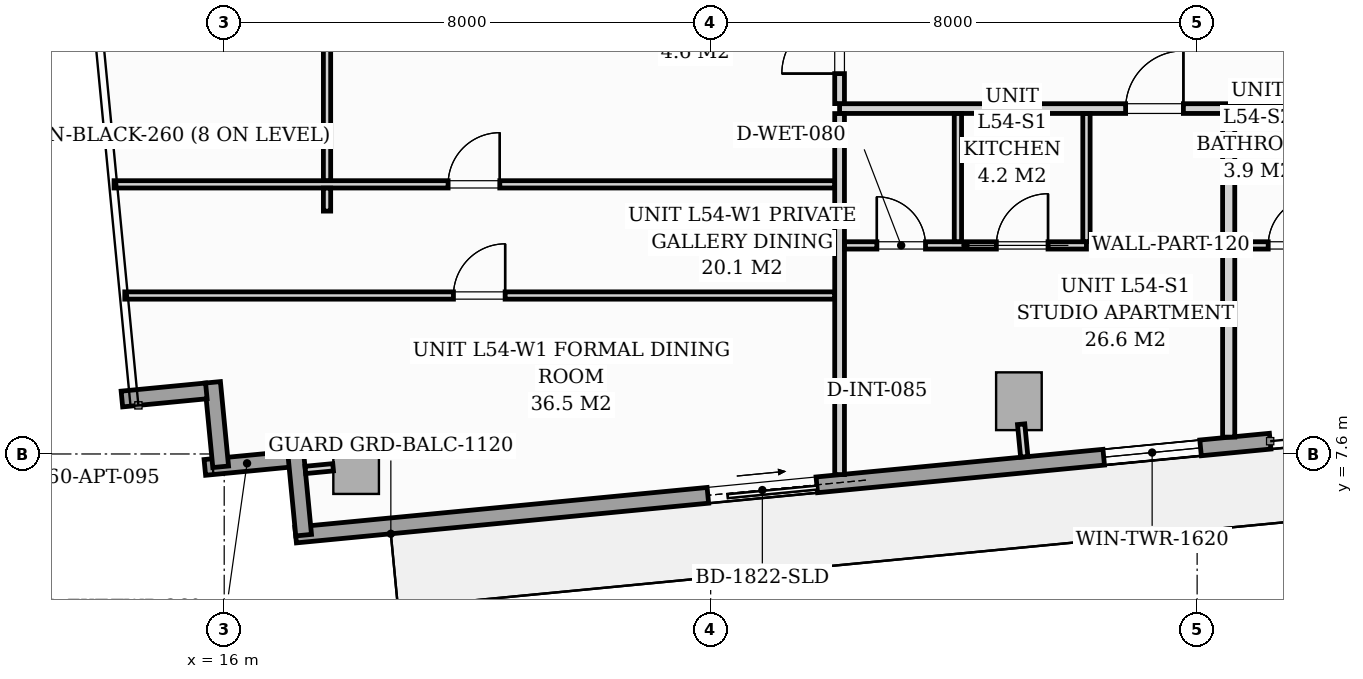
"""IFC4 building model, lengths in metres.
Left out: names, types, materials, properties, quantities, classifications, styles, units other than length and angle.
Written with IfcOpenShell. Run it as: python <this file> out.ifc"""

import sys

from ifc_helpers import new_model, si_unit, direction, frame, frame_2d, origin, origin_2d, place, context, subcontext, project, spatial, rectangle, extrude, source, transform, mapped, element, fill, save


model = new_model("IFC4")
c1 = context("Model", 3, precision=1e-05, world=origin(), true_north=direction((0.0, 1.0)))
c2 = subcontext(c1, "Body", "Model", "MODEL_VIEW")
j1 = project(units=[si_unit("LENGTHUNIT", "METRE"), si_unit("PLANEANGLEUNIT", "RADIAN")], contexts=[c1])
p1 = place(None, origin())
s1 = spatial("IfcSite", under=j1, at=p1, CompositionType="ELEMENT")
p2 = place(p1, origin())
s2 = spatial("IfcBuilding", under=s1, at=p2, CompositionType="ELEMENT")
p3 = place(p2, frame((0.0, 0.0, 189.0)))
s3 = spatial("IfcBuildingStorey", under=s2, at=p3, CompositionType="ELEMENT", Elevation=189.0)
m1 = source(origin(), c2, "Body", "SweptSolid", [
    extrude(rectangle(XDim=0.75, YDim=0.95, at=origin_2d()), origin(), (0.0, 0.0, 1.0), 3.196),
])
for number, where, z_axis, x_axis in (
    (1, (18.169, 7.418, 0.002), (0.0, 0.0, 1.0), (0.995, 0.096, 0.0)),
    (2, (29.069, 8.467, 0.002), (0.0, 0.0, 1.0), (0.995, 0.096, 0.0)),
):
    element("IfcColumn", number, at=place(p3, frame(where, z_axis=z_axis, x_axis=x_axis)), inside=s3, PredefinedType="COLUMN", context=c2, shape_type="MappedRepresentation", body=[
        mapped(m1, transform((0.0, 0.0, 0.0), scale=1.0)),
    ])
p4 = place(p3, frame((17.07, 7.513, 0.0), z_axis=(0.0, 0.0, 1.0), x_axis=(-0.995391056452, -0.09589913835, 0.0)))
e3 = element("IfcWall", 3, at=p4, inside=s3, PredefinedType="STANDARD", context=c2, shape_type="SweptSolid", body=[
    extrude(rectangle(XDim=1.395, YDim=0.26, at=frame_2d((0.698, 0.0))), origin(), (0.0, 0.0, 1.0), 2.94),
])
p5 = place(p3, frame((15.942, 7.389, 0.0), z_axis=(0.0, 0.0, 1.0), x_axis=(-0.095742423056, 0.99540614245, 0.0)))
e4 = element("IfcWall", 4, at=p5, inside=s3, PredefinedType="STANDARD", context=c2, shape_type="SweptSolid", body=[
    extrude(rectangle(XDim=1.395, YDim=0.26, at=frame_2d((0.697, 0.0))), origin(), (0.0, 0.0, 1.0), 2.94),
])
p6 = place(p3, frame((15.706, 8.637, 0.0), z_axis=(0.0, 0.0, 1.0), x_axis=(-0.995391056452, -0.09589913835, 0.0)))
e5 = element("IfcWall", 5, at=p6, inside=s3, PredefinedType="STANDARD", context=c2, shape_type="SweptSolid", body=[
    extrude(rectangle(XDim=1.395, YDim=0.26, at=frame_2d((0.698, 0.0))), origin(), (0.0, 0.0, 1.0), 2.94),
])
p7 = place(p3, frame((33.201, 7.81, 0.0), z_axis=(0.0, 0.0, 1.0), x_axis=(-0.995397074604, -0.095836652014, 0.0)))
e6 = element("IfcWall", 6, at=p7, inside=s3, PredefinedType="STANDARD", context=c2, shape_type="SweptSolid", body=[
    extrude(rectangle(XDim=16.1, YDim=0.26, at=frame_2d((8.05, 0.0))), origin(), (0.0, 0.0, 1.0), 2.94),
])
p8 = place(p7, frame((7.49, 0.0, 0.0)))
e7 = element("IfcOpeningElement", 7, at=p8, cuts=e6, PredefinedType="OPENING", context=c2, shape_type="SweptSolid", body=[
    extrude(rectangle(XDim=1.8, YDim=2.06, at=frame_2d((0.9, 1.03))), frame((0.0, 0.14, 0.0), z_axis=(0.0, -1.0, 0.0), x_axis=(1.0, 0.0, 0.0)), (0.0, 0.0, 1.0), 0.28),
])
p9 = place(p7, frame((1.15, 0.0, 0.65)))
e8 = element("IfcOpeningElement", 8, at=p9, cuts=e6, PredefinedType="OPENING", context=c2, shape_type="SweptSolid", body=[
    extrude(rectangle(XDim=1.6, YDim=1.5, at=frame_2d((0.8, 0.75))), frame((0.0, 0.14, 0.0), z_axis=(0.0, -1.0, 0.0), x_axis=(1.0, 0.0, 0.0)), (0.0, 0.0, 1.0), 0.28),
])
p10 = place(p3, frame((17.306, 6.265, 0.0), z_axis=(0.0, 0.0, 1.0), x_axis=(-0.095915846097, 0.995389446633, 0.0)))
e9 = element("IfcWall", 9, at=p10, inside=s3, PredefinedType="STANDARD", context=c2, shape_type="SweptSolid", body=[
    extrude(rectangle(XDim=1.395, YDim=0.26, at=frame_2d((0.697, 0.0))), origin(), (0.0, 0.0, 1.0), 2.94),
])
p11 = place(p3, frame((26.12, 13.28, 0.0), z_axis=(0.0, 0.0, 1.0), x_axis=(1.0, 0.0, 0.0)))
e10 = element("IfcWall", 10, at=p11, inside=s3, PredefinedType="PARTITIONING", context=c2, shape_type="SweptSolid", body=[
    extrude(rectangle(XDim=21.33, YDim=0.16, at=frame_2d((10.665, 0.0))), origin(), (0.0, 0.0, 1.0), 2.94),
])
p12 = place(p11, frame((4.704, 0.0, 0.0)))
e11 = element("IfcOpeningElement", 11, at=p12, cuts=e10, PredefinedType="OPENING", context=c2, shape_type="SweptSolid", body=[
    extrude(rectangle(XDim=0.95, YDim=2.06, at=frame_2d((0.475, 1.03))), frame((0.0, 0.09, 0.0), z_axis=(0.0, -1.0, 0.0), x_axis=(1.0, 0.0, 0.0)), (0.0, 0.0, 1.0), 0.18),
])
p13 = place(p11, frame((11.6, 0.0, 0.0)))
e12 = element("IfcOpeningElement", 12, at=p13, cuts=e10, PredefinedType="OPENING", context=c2, shape_type="SweptSolid", body=[
    extrude(rectangle(XDim=0.95, YDim=2.06, at=frame_2d((0.475, 1.03))), frame((0.0, 0.09, 0.0), z_axis=(0.0, -1.0, 0.0), x_axis=(1.0, 0.0, 0.0)), (0.0, 0.0, 1.0), 0.18),
])
p14 = place(p11, frame((14.976, 0.0, 0.0)))
e13 = element("IfcOpeningElement", 13, at=p14, cuts=e10, PredefinedType="OPENING", context=c2, shape_type="SweptSolid", body=[
    extrude(rectangle(XDim=0.95, YDim=2.06, at=frame_2d((0.475, 1.03))), frame((0.0, 0.09, 0.0), z_axis=(0.0, -1.0, 0.0), x_axis=(1.0, 0.0, 0.0)), (0.0, 0.0, 1.0), 0.18),
])
p15 = place(p3, frame((26.12, 7.261, 0.0), z_axis=(0.0, 0.0, 1.0), x_axis=(0.0, 1.0, 0.0)))
e14 = element("IfcWall", 14, at=p15, inside=s3, PredefinedType="PARTITIONING", context=c2, shape_type="SweptSolid", body=[
    extrude(rectangle(XDim=5.937, YDim=0.16, at=frame_2d((2.968, 0.0))), origin(), (0.0, 0.0, 1.0), 2.94),
])
p16 = place(p3, frame((26.12, 13.362, 0.0), z_axis=(0.0, 0.0, 1.0), x_axis=(0.0, 1.0, 0.0)))
e15 = element("IfcWall", 15, at=p16, inside=s3, PredefinedType="PARTITIONING", context=c2, shape_type="SweptSolid", body=[
    extrude(rectangle(XDim=4.44, YDim=0.16, at=frame_2d((2.22, 0.0))), origin(), (0.0, 0.0, 1.0), 2.94),
])
p17 = place(p16, frame((0.493, 0.0, 0.0)))
e16 = element("IfcOpeningElement", 16, at=p17, cuts=e15, PredefinedType="OPENING", context=c2, shape_type="SweptSolid", body=[
    extrude(rectangle(XDim=0.95, YDim=2.06, at=frame_2d((0.475, 1.03))), frame((0.0, 0.09, 0.0), z_axis=(0.0, -1.0, 0.0), x_axis=(1.0, 0.0, 0.0)), (0.0, 0.0, 1.0), 0.18),
])
p18 = place(p3, frame((26.202, 11.03, 0.0), z_axis=(0.0, 0.0, 1.0), x_axis=(1.0, 0.0, 0.0)))
e17 = element("IfcWall", 17, at=p18, inside=s3, PredefinedType="PARTITIONING", context=c2, shape_type="SweptSolid", body=[
    extrude(rectangle(XDim=3.978, YDim=0.12, at=frame_2d((1.989, 0.0))), origin(), (0.0, 0.0, 1.0), 2.94),
])
p19 = place(p18, frame((0.531, 0.0, 0.0)))
e18 = element("IfcOpeningElement", 18, at=p19, cuts=e17, PredefinedType="OPENING", context=c2, shape_type="SweptSolid", body=[
    extrude(rectangle(XDim=0.8, YDim=2.02, at=frame_2d((0.4, 1.01))), frame((0.0, 0.07, 0.0), z_axis=(0.0, -1.0, 0.0), x_axis=(1.0, 0.0, 0.0)), (0.0, 0.0, 1.0), 0.14),
])
p20 = place(p18, frame((2.496, 0.0, 0.0)))
e19 = element("IfcOpeningElement", 19, at=p20, cuts=e17, PredefinedType="OPENING", context=c2, shape_type="SweptSolid", body=[
    extrude(rectangle(XDim=0.85, YDim=2.05, at=frame_2d((0.425, 1.025))), frame((0.0, 0.07, 0.0), z_axis=(0.0, -1.0, 0.0), x_axis=(1.0, 0.0, 0.0)), (0.0, 0.0, 1.0), 0.14),
])
for number, where, z_axis, x_axis in (
    (20, (30.18, 11.092, 0.0), (0.0, 0.0, 1.0), (0.0, 1.0, 0.0)),
    (21, (28.066, 11.092, 0.0), (0.0, 0.0, 1.0), (0.0, 1.0, 0.0)),
):
    element("IfcWall", number, at=place(p3, frame(where, z_axis=z_axis, x_axis=x_axis)), inside=s3, PredefinedType="PARTITIONING", context=c2, shape_type="SweptSolid", body=[
        extrude(rectangle(XDim=2.106, YDim=0.12, at=frame_2d((1.053, 0.0))), origin(), (0.0, 0.0, 1.0), 2.94),
    ])
p21 = place(p3, frame((32.519, 7.877, 0.0), z_axis=(0.0, 0.0, 1.0), x_axis=(0.0, 1.0, 0.0)))
e22 = element("IfcWall", 22, at=p21, inside=s3, PredefinedType="PARTITIONING", context=c2, shape_type="SweptSolid", body=[
    extrude(rectangle(XDim=5.321, YDim=0.2, at=frame_2d((2.66, 0.0))), origin(), (0.0, 0.0, 1.0), 2.94),
])
p22 = place(p3, frame((32.621, 11.03, 0.0), z_axis=(0.0, 0.0, 1.0), x_axis=(1.0, 0.0, 0.0)))
e23 = element("IfcWall", 23, at=p22, inside=s3, PredefinedType="PARTITIONING", context=c2, shape_type="SweptSolid", body=[
    extrude(rectangle(XDim=4.098, YDim=0.12, at=frame_2d((2.049, 0.0))), origin(), (0.0, 0.0, 1.0), 2.94),
])
p23 = place(p22, frame((0.548, 0.0, 0.0)))
e24 = element("IfcOpeningElement", 24, at=p23, cuts=e23, PredefinedType="OPENING", context=c2, shape_type="SweptSolid", body=[
    extrude(rectangle(XDim=0.8, YDim=2.02, at=frame_2d((0.4, 1.01))), frame((0.0, 0.07, 0.0), z_axis=(0.0, -1.0, 0.0), x_axis=(1.0, 0.0, 0.0)), (0.0, 0.0, 1.0), 0.14),
])
p24 = place(p22, frame((2.573, 0.0, 0.0)))
e25 = element("IfcOpeningElement", 25, at=p24, cuts=e23, PredefinedType="OPENING", context=c2, shape_type="SweptSolid", body=[
    extrude(rectangle(XDim=0.85, YDim=2.05, at=frame_2d((0.425, 1.025))), frame((0.0, 0.07, 0.0), z_axis=(0.0, -1.0, 0.0), x_axis=(1.0, 0.0, 0.0)), (0.0, 0.0, 1.0), 0.14),
])
p25 = place(p3, frame((14.365, 10.206, 0.0), z_axis=(0.0, 0.0, 1.0), x_axis=(1.0, 0.0, 0.0)))
e26 = element("IfcWall", 26, at=p25, inside=s3, PredefinedType="PARTITIONING", context=c2, shape_type="SweptSolid", body=[
    extrude(rectangle(XDim=11.673, YDim=0.12, at=frame_2d((5.837, 0.0))), origin(), (0.0, 0.0, 1.0), 2.94),
])
p26 = place(p25, frame((5.405, 0.0, 0.0)))
e27 = element("IfcOpeningElement", 27, at=p26, cuts=e26, PredefinedType="OPENING", context=c2, shape_type="SweptSolid", body=[
    extrude(rectangle(XDim=0.85, YDim=2.05, at=frame_2d((0.425, 1.025))), frame((0.0, 0.07, 0.0), z_axis=(0.0, -1.0, 0.0), x_axis=(1.0, 0.0, 0.0)), (0.0, 0.0, 1.0), 0.14),
])
p27 = place(p3, frame((14.189, 12.034, 0.0), z_axis=(0.0, 0.0, 1.0), x_axis=(1.0, 0.0, 0.0)))
e28 = element("IfcWall", 28, at=p27, inside=s3, PredefinedType="PARTITIONING", context=c2, shape_type="SweptSolid", body=[
    extrude(rectangle(XDim=11.849, YDim=0.12, at=frame_2d((5.925, 0.0))), origin(), (0.0, 0.0, 1.0), 2.94),
])
p28 = place(p27, frame((5.493, 0.0, 0.0)))
e29 = element("IfcOpeningElement", 29, at=p28, cuts=e28, PredefinedType="OPENING", context=c2, shape_type="SweptSolid", body=[
    extrude(rectangle(XDim=0.85, YDim=2.05, at=frame_2d((0.425, 1.025))), frame((0.0, 0.07, 0.0), z_axis=(0.0, -1.0, 0.0), x_axis=(1.0, 0.0, 0.0)), (0.0, 0.0, 1.0), 0.14),
])
p29 = place(p3, frame((17.691, 11.594, 0.0), z_axis=(0.0, 0.0, 1.0), x_axis=(0.0, 1.0, 0.0)))
e30 = element("IfcWall", 30, at=p29, inside=s3, PredefinedType="PARTITIONING", context=c2, shape_type="SweptSolid", body=[
    extrude(rectangle(XDim=0.378, YDim=0.12, at=frame_2d((0.189, 0.0))), origin(), (0.0, 0.0, 1.0), 2.94),
])
p30 = place(p3, frame((17.691, 12.096, 0.0), z_axis=(0.0, 0.0, 1.0), x_axis=(0.0, 1.0, 0.0)))
e31 = element("IfcWall", 31, at=p30, inside=s3, PredefinedType="PARTITIONING", context=c2, shape_type="SweptSolid", body=[
    extrude(rectangle(XDim=8.689, YDim=0.12, at=frame_2d((4.344, 0.0))), origin(), (0.0, 0.0, 1.0), 2.94),
])
p31 = place(p30, frame((3.92, 0.0, 0.0)))
e32 = element("IfcOpeningElement", 32, at=p31, cuts=e31, PredefinedType="OPENING", context=c2, shape_type="SweptSolid", body=[
    extrude(rectangle(XDim=0.85, YDim=2.05, at=frame_2d((0.425, 1.025))), frame((0.0, 0.07, 0.0), z_axis=(0.0, -1.0, 0.0), x_axis=(1.0, 0.0, 0.0)), (0.0, 0.0, 1.0), 0.14),
])
p32 = place(p3, frame((17.791, 7.382, 0.0), z_axis=(0.0, 0.0, 1.0), x_axis=(-0.995384576284, -0.09596637586, 0.0)))
e33 = element("IfcWall", 33, at=p32, inside=s3, PredefinedType="PARTITIONING", context=c2, shape_type="SweptSolid", body=[
    extrude(rectangle(XDim=0.458, YDim=0.12, at=frame_2d((0.229, 0.0))), origin(), (0.0, 0.0, 1.0), 2.94),
])
p33 = place(p3, frame((29.105, 8.089, 0.0), z_axis=(0.0, 0.0, 1.0), x_axis=(0.095772948675, -0.995403205893, 0.0)))
e34 = element("IfcWall", 34, at=p33, inside=s3, PredefinedType="PARTITIONING", context=c2, shape_type="SweptSolid", body=[
    extrude(rectangle(XDim=0.538, YDim=0.12, at=frame_2d((0.269, 0.0))), origin(), (0.0, 0.0, 1.0), 2.94),
])
m2 = source(origin(), c2, "Body", "SweptSolid", [
    extrude(rectangle(XDim=1.8, YDim=2.06, at=frame_2d((0.9, 1.03))), frame((0.0, 0.025, 0.0), z_axis=(0.0, -1.0, 0.0), x_axis=(1.0, 0.0, 0.0)), (0.0, 0.0, 1.0), 0.05),
])
p34 = place(p8, origin())
e35 = element("IfcDoor", 35, at=p34, inside=s3, OperationType="SLIDING_TO_LEFT", PredefinedType="DOOR", context=c2, shape_type="MappedRepresentation", body=[
    mapped(m2, transform((0.0, 0.0, 0.0), scale=1.0)),
])
fill(e7, e35)
m3 = source(origin(), c2, "Body", "SweptSolid", [
    extrude(rectangle(XDim=1.6, YDim=1.5, at=frame_2d((0.8, 0.75))), frame((0.0, 0.03, 0.0), z_axis=(0.0, -1.0, 0.0), x_axis=(1.0, 0.0, 0.0)), (0.0, 0.0, 1.0), 0.06),
])
p35 = place(p9, origin())
e36 = element("IfcWindow", 36, at=p35, inside=s3, PartitioningType="SINGLE_PANEL", PredefinedType="WINDOW", context=c2, shape_type="MappedRepresentation", body=[
    mapped(m3, transform((0.0, 0.0, 0.0), scale=1.0)),
])
fill(e8, e36)
m4 = source(origin(), c2, "Body", "SweptSolid", [
    extrude(rectangle(XDim=0.95, YDim=2.06, at=frame_2d((0.475, 1.03))), frame((0.0, 0.025, 0.0), z_axis=(0.0, -1.0, 0.0), x_axis=(1.0, 0.0, 0.0)), (0.0, 0.0, 1.0), 0.05),
])
p36 = place(p12, origin())
e37 = element("IfcDoor", 37, at=p36, inside=s3, OperationType="SINGLE_SWING_RIGHT", PredefinedType="DOOR", context=c2, shape_type="MappedRepresentation", body=[
    mapped(m4, transform((0.0, 0.0, 0.0), scale=1.0)),
])
fill(e11, e37)
m5 = source(origin(), c2, "Body", "SweptSolid", [
    extrude(rectangle(XDim=0.8, YDim=2.02, at=frame_2d((0.4, 1.01))), frame((0.0, 0.025, 0.0), z_axis=(0.0, -1.0, 0.0), x_axis=(1.0, 0.0, 0.0)), (0.0, 0.0, 1.0), 0.05),
])
p37 = place(p19, origin())
e38 = element("IfcDoor", 38, at=p37, inside=s3, OperationType="SINGLE_SWING_LEFT", PredefinedType="DOOR", context=c2, shape_type="MappedRepresentation", body=[
    mapped(m5, transform((0.0, 0.0, 0.0), scale=1.0)),
])
fill(e18, e38)
m6 = source(origin(), c2, "Body", "SweptSolid", [
    extrude(rectangle(XDim=0.85, YDim=2.05, at=frame_2d((0.425, 1.025))), frame((0.0, 0.025, 0.0), z_axis=(0.0, -1.0, 0.0), x_axis=(1.0, 0.0, 0.0)), (0.0, 0.0, 1.0), 0.05),
])
p38 = place(p20, origin())
e39 = element("IfcDoor", 39, at=p38, inside=s3, OperationType="SINGLE_SWING_RIGHT", PredefinedType="DOOR", context=c2, shape_type="MappedRepresentation", body=[
    mapped(m6, transform((0.0, 0.0, 0.0), scale=1.0)),
])
fill(e19, e39)
p39 = place(p23, origin())
e40 = element("IfcDoor", 40, at=p39, inside=s3, OperationType="SINGLE_SWING_RIGHT", PredefinedType="DOOR", context=c2, shape_type="MappedRepresentation", body=[
    mapped(m5, transform((0.0, 0.0, 0.0), scale=1.0)),
])
fill(e24, e40)
p40 = place(p17, origin())
e41 = element("IfcDoor", 41, at=p40, inside=s3, OperationType="SINGLE_SWING_LEFT", PredefinedType="DOOR", context=c2, shape_type="MappedRepresentation", body=[
    mapped(m4, transform((0.0, 0.0, 0.0), scale=1.0)),
])
fill(e16, e41)
p41 = place(p26, origin())
e42 = element("IfcDoor", 42, at=p41, inside=s3, OperationType="SINGLE_SWING_RIGHT", PredefinedType="DOOR", context=c2, shape_type="MappedRepresentation", body=[
    mapped(m6, transform((0.0, 0.0, 0.0), scale=1.0)),
])
fill(e27, e42)
p42 = place(p28, origin())
e43 = element("IfcDoor", 43, at=p42, inside=s3, OperationType="SINGLE_SWING_RIGHT", PredefinedType="DOOR", context=c2, shape_type="MappedRepresentation", body=[
    mapped(m6, transform((0.0, 0.0, 0.0), scale=1.0)),
])
fill(e29, e43)
save(model, sys.argv[1])
